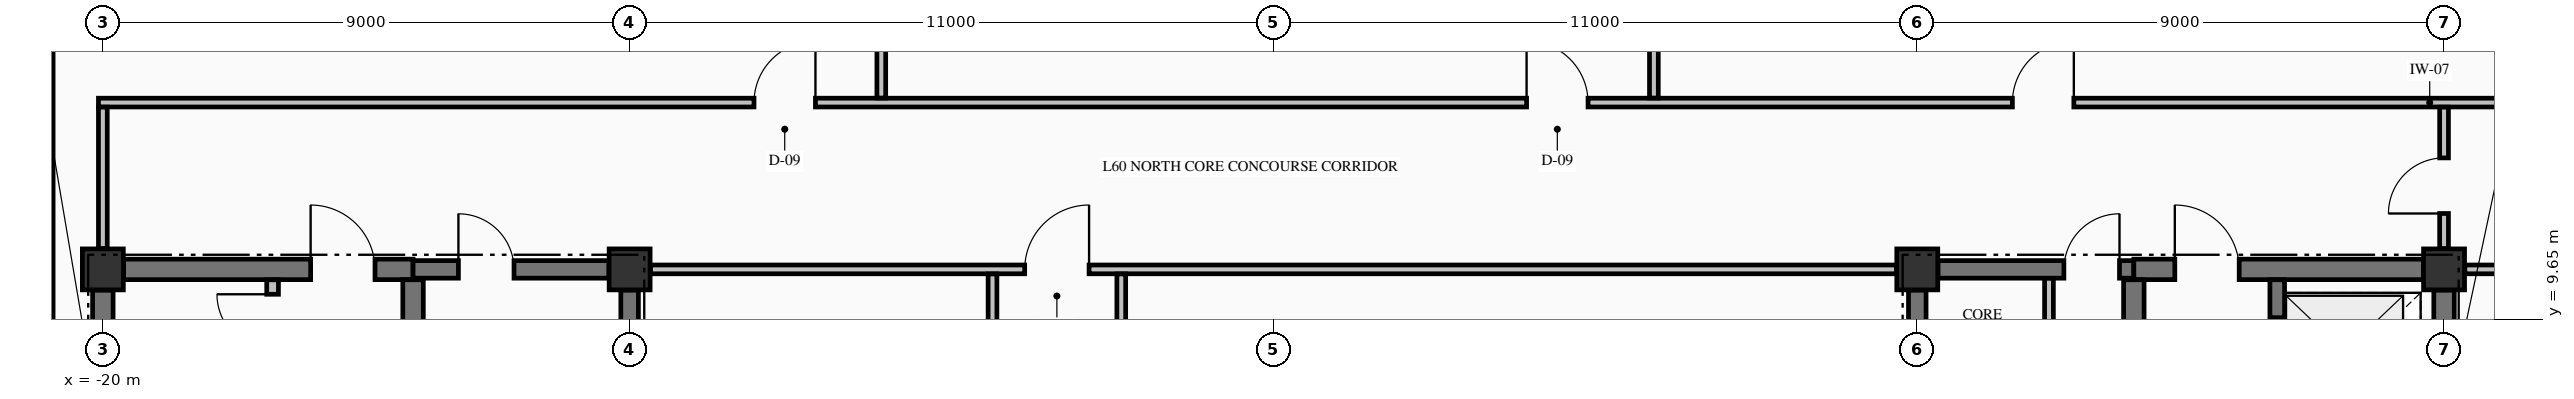
"""IFC4 building model, lengths in metres.
Left out: names, types, materials, properties, quantities, classifications, styles, units other than length and angle.
Written with IfcOpenShell. Run it as: python <this file> out.ifc"""

import sys

from ifc_helpers import new_model, si_unit, direction, frame, frame_2d, origin, origin_2d, place, context, subcontext, project, spatial, rectangle, extrude, element, fill, save


model = new_model("IFC4")
c1 = context("Model", 3, precision=1e-05, world=origin(), true_north=direction((0.0, 1.0)))
c2 = subcontext(c1, "Body", "Model", "MODEL_VIEW")
j1 = project(units=[si_unit("LENGTHUNIT", "METRE"), si_unit("PLANEANGLEUNIT", "RADIAN")], contexts=[c1])
p1 = place(None, origin())
s1 = spatial("IfcSite", under=j1, at=p1, CompositionType="ELEMENT")
p2 = place(p1, origin())
s2 = spatial("IfcBuilding", under=s1, at=p2, CompositionType="ELEMENT")
p3 = place(p2, frame((0.0, 0.0, 230.05)))
s3 = spatial("IfcBuildingStorey", under=s2, at=p3, CompositionType="ELEMENT", Elevation=230.05)
for number, where, z_axis, x_axis in (
    (1, (-20.0, 10.5, -0.25), (0.0, 0.0, 1.0), (1.0, 0.0, 0.0)),
    (2, (-11.0, 10.5, -0.25), (0.0, 0.0, 1.0), (1.0, 0.0, 0.0)),
    (3, (11.0, 10.5, -0.25), (0.0, 0.0, 1.0), (1.0, 0.0, 0.0)),
    (4, (20.0, 10.5, -0.25), (0.0, 0.0, 1.0), (1.0, 0.0, 0.0)),
):
    element("IfcColumn", number, at=place(p3, frame(where, z_axis=z_axis, x_axis=x_axis)), inside=s3, PredefinedType="COLUMN", context=c2, shape_type="SweptSolid", body=[
        extrude(rectangle(XDim=0.7, YDim=0.7, at=origin_2d()), origin(), (0.0, 0.0, 1.0), 3.23),
    ])
p4 = place(p3, frame((-21.0, 17.545, 0.0), z_axis=(0.0, 0.0, 1.0), x_axis=(0.0, -1.0, 0.0)))
e5 = element("IfcWall", 5, at=p4, inside=s3, PredefinedType="STANDARD", context=c2, shape_type="SweptSolid", body=[
    extrude(rectangle(XDim=8.09, YDim=0.3, at=frame_2d((4.045, 0.0))), origin(), (0.0, 0.0, 1.0), 2.372),
])
p5 = place(p3, frame((-19.646, 10.5, 0.0), z_axis=(0.0, 0.0, 1.0), x_axis=(1.0, 0.0, 0.0)))
e6 = element("IfcWall", 6, at=p5, inside=s3, PredefinedType="SHEAR", context=c2, shape_type="SweptSolid", body=[
    extrude(rectangle(XDim=4.946, YDim=0.35, at=frame_2d((2.473, 0.0))), origin(), (0.0, 0.0, 1.0), 2.98),
])
p6 = place(p5, frame((3.196, 0.0, 0.0)))
e7 = element("IfcOpeningElement", 7, at=p6, cuts=e6, PredefinedType="OPENING", context=c2, shape_type="SweptSolid", body=[
    extrude(rectangle(XDim=1.1, YDim=2.15, at=frame_2d((0.55, 1.075))), frame((0.0, 0.185, 0.0), z_axis=(0.0, -1.0, 0.0), x_axis=(1.0, 0.0, 0.0)), (0.0, 0.0, 1.0), 0.37),
])
p7 = place(p3, frame((-14.7, 10.5, 0.0), z_axis=(0.0, 0.0, 1.0), x_axis=(1.0, 0.0, 0.0)))
e8 = element("IfcWall", 8, at=p7, inside=s3, PredefinedType="SHEAR", context=c2, shape_type="SweptSolid", body=[
    extrude(rectangle(XDim=3.346, YDim=0.3, at=frame_2d((1.673, 0.0))), origin(), (0.0, 0.0, 1.0), 2.98),
])
p8 = place(p7, frame((0.775, 0.0, 0.0)))
e9 = element("IfcOpeningElement", 9, at=p8, cuts=e8, PredefinedType="OPENING", context=c2, shape_type="SweptSolid", body=[
    extrude(rectangle(XDim=0.95, YDim=2.15, at=frame_2d((0.475, 1.075))), frame((0.0, 0.16, 0.0), z_axis=(0.0, -1.0, 0.0), x_axis=(1.0, 0.0, 0.0)), (0.0, 0.0, 1.0), 0.32),
])
p9 = place(p3, frame((11.354, 10.5, 0.0), z_axis=(0.0, 0.0, 1.0), x_axis=(1.0, 0.0, 0.0)))
e10 = element("IfcWall", 10, at=p9, inside=s3, PredefinedType="SHEAR", context=c2, shape_type="SweptSolid", body=[
    extrude(rectangle(XDim=3.346, YDim=0.3, at=frame_2d((1.673, 0.0))), origin(), (0.0, 0.0, 1.0), 2.98),
])
p10 = place(p9, frame((2.151, 0.0, 0.0)))
e11 = element("IfcOpeningElement", 11, at=p10, cuts=e10, PredefinedType="OPENING", context=c2, shape_type="SweptSolid", body=[
    extrude(rectangle(XDim=0.95, YDim=2.15, at=frame_2d((0.475, 1.075))), frame((0.0, 0.16, 0.0), z_axis=(0.0, -1.0, 0.0), x_axis=(1.0, 0.0, 0.0)), (0.0, 0.0, 1.0), 0.32),
])
p11 = place(p3, frame((14.7, 10.5, 0.0), z_axis=(0.0, 0.0, 1.0), x_axis=(1.0, 0.0, 0.0)))
e12 = element("IfcWall", 12, at=p11, inside=s3, PredefinedType="SHEAR", context=c2, shape_type="SweptSolid", body=[
    extrude(rectangle(XDim=4.946, YDim=0.35, at=frame_2d((2.473, 0.0))), origin(), (0.0, 0.0, 1.0), 2.98),
])
p12 = place(p11, frame((0.7, 0.0, 0.0)))
e13 = element("IfcOpeningElement", 13, at=p12, cuts=e12, PredefinedType="OPENING", context=c2, shape_type="SweptSolid", body=[
    extrude(rectangle(XDim=1.1, YDim=2.15, at=frame_2d((0.55, 1.075))), frame((0.0, 0.185, 0.0), z_axis=(0.0, -1.0, 0.0), x_axis=(1.0, 0.0, 0.0)), (0.0, 0.0, 1.0), 0.37),
])
p13 = place(p3, frame((-10.644, 10.5, 0.0), z_axis=(0.0, 0.0, 1.0), x_axis=(1.0, 0.0, 0.0)))
e14 = element("IfcWall", 14, at=p13, inside=s3, PredefinedType="PARTITIONING", context=c2, shape_type="SweptSolid", body=[
    extrude(rectangle(XDim=21.288, YDim=0.15, at=frame_2d((10.644, 0.0))), origin(), (0.0, 0.0, 1.0), 2.98),
])
p14 = place(p13, frame((6.394, 0.0, 0.0)))
e15 = element("IfcOpeningElement", 15, at=p14, cuts=e14, PredefinedType="OPENING", context=c2, shape_type="SweptSolid", body=[
    extrude(rectangle(XDim=1.1, YDim=2.15, at=frame_2d((0.55, 1.075))), frame((0.0, 0.085, 0.0), z_axis=(0.0, -1.0, 0.0), x_axis=(1.0, 0.0, 0.0)), (0.0, 0.0, 1.0), 0.17),
])
p15 = place(p3, frame((20.356, 10.5, 0.0), z_axis=(0.0, 0.0, 1.0), x_axis=(1.0, 0.0, 0.0)))
e16 = element("IfcWall", 16, at=p15, inside=s3, PredefinedType="PARTITIONING", context=c2, shape_type="SweptSolid", body=[
    extrude(rectangle(XDim=5.479, YDim=0.15, at=frame_2d((2.74, 0.0))), origin(), (0.0, 0.0, 1.0), 2.98),
])
p16 = place(p15, frame((2.144, 0.0, 0.0)))
e17 = element("IfcOpeningElement", 17, at=p16, cuts=e16, PredefinedType="OPENING", context=c2, shape_type="SweptSolid", body=[
    extrude(rectangle(XDim=1.0, YDim=2.15, at=frame_2d((0.5, 1.075))), frame((0.0, 0.085, 0.0), z_axis=(0.0, -1.0, 0.0), x_axis=(1.0, 0.0, 0.0)), (0.0, 0.0, 1.0), 0.17),
])
p17 = place(p3, frame((-20.075, 13.35, 0.0), z_axis=(0.0, 0.0, 1.0), x_axis=(1.0, 0.0, 0.0)))
e18 = element("IfcWall", 18, at=p17, inside=s3, PredefinedType="PARTITIONING", context=c2, shape_type="SweptSolid", body=[
    extrude(rectangle(XDim=45.91, YDim=0.15, at=frame_2d((22.955, 0.0))), origin(), (0.0, 0.0, 1.0), 2.98),
])
p18 = place(p17, frame((11.2, 0.0, 0.0)))
e19 = element("IfcOpeningElement", 19, at=p18, cuts=e18, PredefinedType="OPENING", context=c2, shape_type="SweptSolid", body=[
    extrude(rectangle(XDim=1.05, YDim=2.15, at=frame_2d((0.525, 1.075))), frame((0.0, 0.085, 0.0), z_axis=(0.0, -1.0, 0.0), x_axis=(1.0, 0.0, 0.0)), (0.0, 0.0, 1.0), 0.17),
])
p19 = place(p17, frame((24.4, 0.0, 0.0)))
e20 = element("IfcOpeningElement", 20, at=p19, cuts=e18, PredefinedType="OPENING", context=c2, shape_type="SweptSolid", body=[
    extrude(rectangle(XDim=1.05, YDim=2.15, at=frame_2d((0.525, 1.075))), frame((0.0, 0.085, 0.0), z_axis=(0.0, -1.0, 0.0), x_axis=(1.0, 0.0, 0.0)), (0.0, 0.0, 1.0), 0.17),
])
p20 = place(p17, frame((32.7, 0.0, 0.0)))
e21 = element("IfcOpeningElement", 21, at=p20, cuts=e18, PredefinedType="OPENING", context=c2, shape_type="SweptSolid", body=[
    extrude(rectangle(XDim=1.05, YDim=2.15, at=frame_2d((0.525, 1.075))), frame((0.0, 0.085, 0.0), z_axis=(0.0, -1.0, 0.0), x_axis=(1.0, 0.0, 0.0)), (0.0, 0.0, 1.0), 0.17),
])
p21 = place(p3, frame((-20.0, 5.327, 0.0), z_axis=(0.0, 0.0, 1.0), x_axis=(0.0, 1.0, 0.0)))
e22 = element("IfcWall", 22, at=p21, inside=s3, PredefinedType="SHEAR", context=c2, shape_type="SweptSolid", body=[
    extrude(rectangle(XDim=4.819, YDim=0.35, at=frame_2d((2.41, 0.0))), origin(), (0.0, 0.0, 1.0), 2.98),
])
p22 = place(p3, frame((-14.7, 5.852, 0.0), z_axis=(0.0, 0.0, 1.0), x_axis=(0.0, 1.0, 0.0)))
e23 = element("IfcWall", 23, at=p22, inside=s3, PredefinedType="SHEAR", context=c2, shape_type="SweptSolid", body=[
    extrude(rectangle(XDim=4.471, YDim=0.35, at=frame_2d((2.235, 0.0))), origin(), (0.0, 0.0, 1.0), 2.98),
])
for number, where, z_axis, x_axis in (
    (24, (-11.0, 5.852, 0.0), (0.0, 0.0, 1.0), (0.0, 1.0, 0.0)),
    (25, (11.0, 5.852, 0.0), (0.0, 0.0, 1.0), (0.0, 1.0, 0.0)),
):
    element("IfcWall", number, at=place(p3, frame(where, z_axis=z_axis, x_axis=x_axis)), inside=s3, PredefinedType="SHEAR", context=c2, shape_type="SweptSolid", body=[
        extrude(rectangle(XDim=4.294, YDim=0.3, at=frame_2d((2.147, 0.0))), origin(), (0.0, 0.0, 1.0), 2.98),
    ])
p23 = place(p3, frame((14.7, 5.852, 0.0), z_axis=(0.0, 0.0, 1.0), x_axis=(0.0, 1.0, 0.0)))
e26 = element("IfcWall", 26, at=p23, inside=s3, PredefinedType="SHEAR", context=c2, shape_type="SweptSolid", body=[
    extrude(rectangle(XDim=4.471, YDim=0.35, at=frame_2d((2.235, 0.0))), origin(), (0.0, 0.0, 1.0), 2.98),
])
p24 = place(p3, frame((17.15, 7.877, 0.0), z_axis=(0.0, 0.0, 1.0), x_axis=(0.0, 1.0, 0.0)))
e27 = element("IfcWall", 27, at=p24, inside=s3, PredefinedType="SOLIDWALL", context=c2, shape_type="SweptSolid", body=[
    extrude(rectangle(XDim=2.446, YDim=0.25, at=frame_2d((1.223, 0.0))), origin(), (0.0, 0.0, 1.0), 2.98),
])
p25 = place(p24, frame((0.698, 0.0, 0.0)))
e28 = element("IfcOpeningElement", 28, at=p25, cuts=e27, PredefinedType="OPENING", context=c2, shape_type="SweptSolid", body=[
    extrude(rectangle(XDim=1.1, YDim=2.2, at=frame_2d((0.55, 1.1))), frame((0.0, 0.135, 0.0), z_axis=(0.0, -1.0, 0.0), x_axis=(1.0, 0.0, 0.0)), (0.0, 0.0, 1.0), 0.27),
])
p26 = place(p3, frame((20.0, 7.877, 0.0), z_axis=(0.0, 0.0, 1.0), x_axis=(0.0, 1.0, 0.0)))
e29 = element("IfcWall", 29, at=p26, inside=s3, PredefinedType="SHEAR", context=c2, shape_type="SweptSolid", body=[
    extrude(rectangle(XDim=2.269, YDim=0.35, at=frame_2d((1.135, 0.0))), origin(), (0.0, 0.0, 1.0), 2.98),
])
p27 = place(p3, frame((-20.0, 10.856, 0.0), z_axis=(0.0, 0.0, 1.0), x_axis=(0.0, 1.0, 0.0)))
e30 = element("IfcWall", 30, at=p27, inside=s3, PredefinedType="PARTITIONING", context=c2, shape_type="SweptSolid", body=[
    extrude(rectangle(XDim=2.416, YDim=0.15, at=frame_2d((1.208, 0.0))), origin(), (0.0, 0.0, 1.0), 2.57),
])
p28 = place(p3, frame((-17.1, 8.778, 0.0), z_axis=(0.0, 0.0, 1.0), x_axis=(0.0, 1.0, 0.0)))
e31 = element("IfcWall", 31, at=p28, inside=s3, PredefinedType="PARTITIONING", context=c2, shape_type="SweptSolid", body=[
    extrude(rectangle(XDim=1.544, YDim=0.2, at=frame_2d((0.772, 0.0))), origin(), (0.0, 0.0, 1.0), 2.98),
])
p29 = place(p28, frame((0.347, 0.0, 0.0)))
e32 = element("IfcOpeningElement", 32, at=p29, cuts=e31, PredefinedType="OPENING", context=c2, shape_type="SweptSolid", body=[
    extrude(rectangle(XDim=0.95, YDim=2.15, at=frame_2d((0.475, 1.075))), frame((0.0, 0.11, 0.0), z_axis=(0.0, -1.0, 0.0), x_axis=(1.0, 0.0, 0.0)), (0.0, 0.0, 1.0), 0.22),
])
p30 = place(p3, frame((-6.7, 13.428, 0.0), z_axis=(0.0, 0.0, 1.0), x_axis=(0.0, 1.0, 0.0)))
e33 = element("IfcWall", 33, at=p30, inside=s3, PredefinedType="PARTITIONING", context=c2, shape_type="SweptSolid", body=[
    extrude(rectangle(XDim=9.907, YDim=0.15, at=frame_2d((4.954, 0.0))), origin(), (0.0, 0.0, 1.0), 2.98),
])
for number, where, z_axis, x_axis in (
    (34, (-4.8, 2.978, 0.0), (0.0, 0.0, 1.0), (0.0, 1.0, 0.0)),
    (35, (-2.6, 2.978, 0.0), (0.0, 0.0, 1.0), (0.0, 1.0, 0.0)),
):
    element("IfcWall", number, at=place(p3, frame(where, z_axis=z_axis, x_axis=x_axis)), inside=s3, PredefinedType="PARTITIONING", context=c2, shape_type="SweptSolid", body=[
        extrude(rectangle(XDim=7.444, YDim=0.15, at=frame_2d((3.722, 0.0))), origin(), (0.0, 0.0, 1.0), 2.98),
    ])
p31 = place(p3, frame((6.5, 13.428, 0.0), z_axis=(0.0, 0.0, 1.0), x_axis=(0.0, 1.0, 0.0)))
e36 = element("IfcWall", 36, at=p31, inside=s3, PredefinedType="PARTITIONING", context=c2, shape_type="SweptSolid", body=[
    extrude(rectangle(XDim=9.907, YDim=0.15, at=frame_2d((4.954, 0.0))), origin(), (0.0, 0.0, 1.0), 2.98),
])
p32 = place(p3, frame((13.25, 5.853, 0.0), z_axis=(0.0, 0.0, 1.0), x_axis=(0.0, 1.0, 0.0)))
e37 = element("IfcWall", 37, at=p32, inside=s3, PredefinedType="PARTITIONING", context=c2, shape_type="SweptSolid", body=[
    extrude(rectangle(XDim=4.494, YDim=0.15, at=frame_2d((2.247, 0.0))), origin(), (0.0, 0.0, 1.0), 2.98),
])
p33 = place(p32, frame((1.472, 0.0, 0.0)))
e38 = element("IfcOpeningElement", 38, at=p33, cuts=e37, PredefinedType="OPENING", context=c2, shape_type="SweptSolid", body=[
    extrude(rectangle(XDim=0.95, YDim=2.15, at=frame_2d((0.475, 1.075))), frame((0.0, 0.085, 0.0), z_axis=(0.0, -1.0, 0.0), x_axis=(1.0, 0.0, 0.0)), (0.0, 0.0, 1.0), 0.17),
])
p34 = place(p3, frame((20.0, 10.856, 0.0), z_axis=(0.0, 0.0, 1.0), x_axis=(0.0, 1.0, 0.0)))
e39 = element("IfcWall", 39, at=p34, inside=s3, PredefinedType="PARTITIONING", context=c2, shape_type="SweptSolid", body=[
    extrude(rectangle(XDim=2.416, YDim=0.15, at=frame_2d((1.208, 0.0))), origin(), (0.0, 0.0, 1.0), 2.98),
])
p35 = place(p34, frame((0.599, 0.0, 0.0)))
e40 = element("IfcOpeningElement", 40, at=p35, cuts=e39, PredefinedType="OPENING", context=c2, shape_type="SweptSolid", body=[
    extrude(rectangle(XDim=0.95, YDim=2.15, at=frame_2d((0.475, 1.075))), frame((0.0, 0.085, 0.0), z_axis=(0.0, -1.0, 0.0), x_axis=(1.0, 0.0, 0.0)), (0.0, 0.0, 1.0), 0.17),
])
p36 = place(p8, origin())
e41 = element("IfcDoor", 41, at=p36, inside=s3, OperationType="SINGLE_SWING_LEFT", PredefinedType="DOOR", context=c2, shape_type="SweptSolid", body=[
    extrude(rectangle(XDim=0.95, YDim=2.15, at=frame_2d((0.475, 1.075))), frame((0.0, 0.025, 0.0), z_axis=(0.0, -1.0, 0.0), x_axis=(1.0, 0.0, 0.0)), (0.0, 0.0, 1.0), 0.05),
])
fill(e9, e41)
p37 = place(p10, origin())
e42 = element("IfcDoor", 42, at=p37, inside=s3, OperationType="SINGLE_SWING_RIGHT", PredefinedType="DOOR", context=c2, shape_type="SweptSolid", body=[
    extrude(rectangle(XDim=0.95, YDim=2.15, at=frame_2d((0.475, 1.075))), frame((0.0, 0.025, 0.0), z_axis=(0.0, -1.0, 0.0), x_axis=(1.0, 0.0, 0.0)), (0.0, 0.0, 1.0), 0.05),
])
fill(e11, e42)
p38 = place(p6, origin())
e43 = element("IfcDoor", 43, at=p38, inside=s3, OperationType="SINGLE_SWING_LEFT", PredefinedType="DOOR", context=c2, shape_type="SweptSolid", body=[
    extrude(rectangle(XDim=1.1, YDim=2.15, at=frame_2d((0.55, 1.075))), frame((0.0, 0.025, 0.0), z_axis=(0.0, -1.0, 0.0), x_axis=(1.0, 0.0, 0.0)), (0.0, 0.0, 1.0), 0.05),
])
fill(e7, e43)
p39 = place(p29, origin())
e44 = element("IfcDoor", 44, at=p39, inside=s3, OperationType="SINGLE_SWING_RIGHT", PredefinedType="DOOR", context=c2, shape_type="SweptSolid", body=[
    extrude(rectangle(XDim=0.95, YDim=2.15, at=frame_2d((0.475, 1.075))), frame((0.0, 0.025, 0.0), z_axis=(0.0, -1.0, 0.0), x_axis=(1.0, 0.0, 0.0)), (0.0, 0.0, 1.0), 0.05),
])
fill(e32, e44)
p40 = place(p25, origin())
e45 = element("IfcDoor", 45, at=p40, inside=s3, OperationType="SLIDING_TO_RIGHT", PredefinedType="DOOR", context=c2, shape_type="SweptSolid", body=[
    extrude(rectangle(XDim=1.1, YDim=2.2, at=frame_2d((0.55, 1.1))), frame((0.0, 0.025, 0.0), z_axis=(0.0, -1.0, 0.0), x_axis=(1.0, 0.0, 0.0)), (0.0, 0.0, 1.0), 0.05),
])
fill(e28, e45)
p41 = place(p12, origin())
e46 = element("IfcDoor", 46, at=p41, inside=s3, OperationType="SINGLE_SWING_LEFT", PredefinedType="DOOR", context=c2, shape_type="SweptSolid", body=[
    extrude(rectangle(XDim=1.1, YDim=2.15, at=frame_2d((0.55, 1.075))), frame((0.0, 0.025, 0.0), z_axis=(0.0, -1.0, 0.0), x_axis=(1.0, 0.0, 0.0)), (0.0, 0.0, 1.0), 0.05),
])
fill(e13, e46)
p42 = place(p14, origin())
e47 = element("IfcDoor", 47, at=p42, inside=s3, OperationType="SINGLE_SWING_RIGHT", PredefinedType="DOOR", context=c2, shape_type="SweptSolid", body=[
    extrude(rectangle(XDim=1.1, YDim=2.15, at=frame_2d((0.55, 1.075))), frame((0.0, 0.025, 0.0), z_axis=(0.0, -1.0, 0.0), x_axis=(1.0, 0.0, 0.0)), (0.0, 0.0, 1.0), 0.05),
])
fill(e15, e47)
p43 = place(p18, origin())
e48 = element("IfcDoor", 48, at=p43, inside=s3, OperationType="SINGLE_SWING_RIGHT", PredefinedType="DOOR", context=c2, shape_type="SweptSolid", body=[
    extrude(rectangle(XDim=1.05, YDim=2.15, at=frame_2d((0.525, 1.075))), frame((0.0, 0.025, 0.0), z_axis=(0.0, -1.0, 0.0), x_axis=(1.0, 0.0, 0.0)), (0.0, 0.0, 1.0), 0.05),
])
fill(e19, e48)
p44 = place(p19, origin())
e49 = element("IfcDoor", 49, at=p44, inside=s3, OperationType="SINGLE_SWING_LEFT", PredefinedType="DOOR", context=c2, shape_type="SweptSolid", body=[
    extrude(rectangle(XDim=1.05, YDim=2.15, at=frame_2d((0.525, 1.075))), frame((0.0, 0.025, 0.0), z_axis=(0.0, -1.0, 0.0), x_axis=(1.0, 0.0, 0.0)), (0.0, 0.0, 1.0), 0.05),
])
fill(e20, e49)
p45 = place(p20, origin())
e50 = element("IfcDoor", 50, at=p45, inside=s3, OperationType="SINGLE_SWING_RIGHT", PredefinedType="DOOR", context=c2, shape_type="SweptSolid", body=[
    extrude(rectangle(XDim=1.05, YDim=2.15, at=frame_2d((0.525, 1.075))), frame((0.0, 0.025, 0.0), z_axis=(0.0, -1.0, 0.0), x_axis=(1.0, 0.0, 0.0)), (0.0, 0.0, 1.0), 0.05),
])
fill(e21, e50)
p46 = place(p35, origin())
e51 = element("IfcDoor", 51, at=p46, inside=s3, OperationType="SINGLE_SWING_LEFT", PredefinedType="DOOR", context=c2, shape_type="SweptSolid", body=[
    extrude(rectangle(XDim=0.95, YDim=2.15, at=frame_2d((0.475, 1.075))), frame((0.0, 0.025, 0.0), z_axis=(0.0, -1.0, 0.0), x_axis=(1.0, 0.0, 0.0)), (0.0, 0.0, 1.0), 0.05),
])
fill(e40, e51)
save(model, sys.argv[1])
